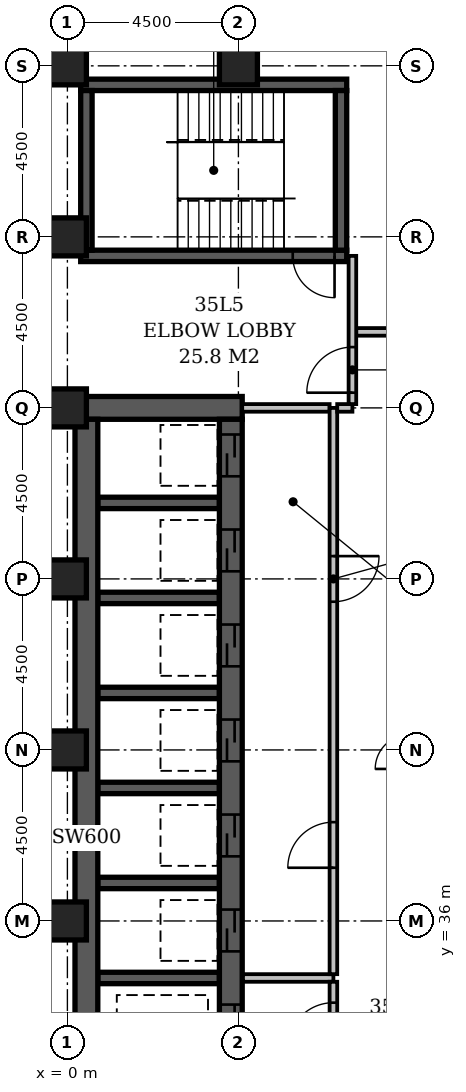
"""IFC4 building model, lengths in metres.
Left out: names, types, materials, properties, quantities, classifications, styles, units other than length and angle.
Written with IfcOpenShell. Run it as: python <this file> out.ifc"""

import sys

from ifc_helpers import new_model, si_unit, direction, frame, frame_2d, origin, origin_2d, place, context, subcontext, project, spatial, rectangle, extrude, element, fill, save


model = new_model("IFC4")
c1 = context("Model", 3, precision=1e-05, world=origin(), true_north=direction((0.0, 1.0)))
c2 = subcontext(c1, "Body", "Model", "MODEL_VIEW")
j1 = project(units=[si_unit("LENGTHUNIT", "METRE"), si_unit("PLANEANGLEUNIT", "RADIAN")], contexts=[c1])
p1 = place(None, origin())
s1 = spatial("IfcSite", under=j1, at=p1, CompositionType="ELEMENT")
p2 = place(p1, origin())
s2 = spatial("IfcBuilding", under=s1, at=p2, CompositionType="ELEMENT")
p3 = place(p2, frame((0.0, 0.0, 141.2)))
s3 = spatial("IfcBuildingStorey", under=s2, at=p3, CompositionType="ELEMENT", Elevation=141.2)
p4 = place(p3, frame((0.2, 49.5, -0.3), z_axis=(0.0, 0.0, 1.0), x_axis=(1.0, 0.0, 0.0)))
e1 = element("IfcWall", 1, at=p4, inside=s3, PredefinedType="SHEAR", context=c2, shape_type="SweptSolid", body=[
    extrude(rectangle(XDim=4.4, YDim=0.6, at=frame_2d((2.2, 0.0))), origin(), (0.0, 0.0, 1.0), 3.6),
])
p5 = place(p3, frame((0.35, 53.5, -0.3), z_axis=(0.0, 0.0, 1.0), x_axis=(1.0, 0.0, 0.0)))
e2 = element("IfcWall", 2, at=p5, inside=s3, PredefinedType="SHEAR", context=c2, shape_type="SweptSolid", body=[
    extrude(rectangle(XDim=7.0, YDim=0.3, at=frame_2d((3.5, 0.0))), origin(), (0.0, 0.0, 1.0), 3.6),
])
p6 = place(p5, frame((5.58, 0.0, 0.3)))
e3 = element("IfcOpeningElement", 3, at=p6, cuts=e2, PredefinedType="OPENING", context=c2, shape_type="SweptSolid", body=[
    extrude(rectangle(XDim=1.1, YDim=2.1, at=frame_2d((0.55, 1.05))), frame((0.0, 0.162, 0.0), z_axis=(0.0, -1.0, 0.0), x_axis=(1.0, 0.0, 0.0)), (0.0, 0.0, 1.0), 0.324),
])
p7 = place(p3, frame((0.35, 58.0, -0.3), z_axis=(0.0, 0.0, 1.0), x_axis=(1.0, 0.0, 0.0)))
e4 = element("IfcWall", 4, at=p7, inside=s3, PredefinedType="SHEAR", context=c2, shape_type="SweptSolid", body=[
    extrude(rectangle(XDim=7.0, YDim=0.3, at=frame_2d((3.5, 0.0))), origin(), (0.0, 0.0, 1.0), 3.6),
])
p8 = place(p3, frame((0.5, 27.15, -0.3), z_axis=(0.0, 0.0, 1.0), x_axis=(0.0, 1.0, 0.0)))
e5 = element("IfcWall", 5, at=p8, inside=s3, PredefinedType="SHEAR", context=c2, shape_type="SweptSolid", body=[
    extrude(rectangle(XDim=22.05, YDim=0.6, at=frame_2d((11.025, 0.0))), origin(), (0.0, 0.0, 1.0), 3.6),
])
p9 = place(p3, frame((0.5, 53.65, -0.3), z_axis=(0.0, 0.0, 1.0), x_axis=(0.0, 1.0, 0.0)))
e6 = element("IfcWall", 6, at=p9, inside=s3, PredefinedType="SHEAR", context=c2, shape_type="SweptSolid", body=[
    extrude(rectangle(XDim=4.2, YDim=0.3, at=frame_2d((2.1, 0.0))), origin(), (0.0, 0.0, 1.0), 3.6),
])
for number, where, z_axis, x_axis in (
    (7, (0.8, 34.5, -0.3), (0.0, 0.0, 1.0), (1.0, 0.0, 0.0)),
    (8, (0.8, 37.0, -0.3), (0.0, 0.0, 1.0), (1.0, 0.0, 0.0)),
    (9, (0.8, 39.5, -0.3), (0.0, 0.0, 1.0), (1.0, 0.0, 0.0)),
    (10, (0.8, 42.0, -0.3), (0.0, 0.0, 1.0), (1.0, 0.0, 0.0)),
    (11, (0.8, 44.5, -0.3), (0.0, 0.0, 1.0), (1.0, 0.0, 0.0)),
    (12, (0.8, 47.0, -0.3), (0.0, 0.0, 1.0), (1.0, 0.0, 0.0)),
):
    element("IfcWall", number, at=place(p3, frame(where, z_axis=z_axis, x_axis=x_axis)), inside=s3, PredefinedType="SHEAR", context=c2, shape_type="SweptSolid", body=[
        extrude(rectangle(XDim=3.2, YDim=0.3, at=frame_2d((1.6, 0.0))), origin(), (0.0, 0.0, 1.0), 3.6),
    ])
p10 = place(p3, frame((4.3, 27.15, -0.3), z_axis=(0.0, 0.0, 1.0), x_axis=(0.0, 1.0, 0.0)))
e13 = element("IfcWall", 13, at=p10, inside=s3, PredefinedType="SHEAR", context=c2, shape_type="SweptSolid", body=[
    extrude(rectangle(XDim=22.05, YDim=0.6, at=frame_2d((11.025, 0.0))), origin(), (0.0, 0.0, 1.0), 3.6),
])
p11 = place(p10, frame((3.05, 0.0, 0.3)))
e14 = element("IfcOpeningElement", 14, at=p11, cuts=e13, PredefinedType="OPENING", context=c2, shape_type="SweptSolid", body=[
    extrude(rectangle(XDim=1.1, YDim=2.1, at=frame_2d((0.55, 1.05))), frame((0.0, 0.312, 0.0), z_axis=(0.0, -1.0, 0.0), x_axis=(1.0, 0.0, 0.0)), (0.0, 0.0, 1.0), 0.624),
])
p12 = place(p10, frame((0.55, 0.0, 0.3)))
e15 = element("IfcOpeningElement", 15, at=p12, cuts=e13, PredefinedType="OPENING", context=c2, shape_type="SweptSolid", body=[
    extrude(rectangle(XDim=1.1, YDim=2.1, at=frame_2d((0.55, 1.05))), frame((0.0, 0.312, 0.0), z_axis=(0.0, -1.0, 0.0), x_axis=(1.0, 0.0, 0.0)), (0.0, 0.0, 1.0), 0.624),
])
p13 = place(p10, frame((20.55, 0.0, 0.3)))
e16 = element("IfcOpeningElement", 16, at=p13, cuts=e13, PredefinedType="OPENING", context=c2, shape_type="SweptSolid", body=[
    extrude(rectangle(XDim=1.1, YDim=2.1, at=frame_2d((0.55, 1.05))), frame((0.0, 0.312, 0.0), z_axis=(0.0, -1.0, 0.0), x_axis=(1.0, 0.0, 0.0)), (0.0, 0.0, 1.0), 0.624),
])
p14 = place(p10, frame((18.05, 0.0, 0.3)))
e17 = element("IfcOpeningElement", 17, at=p14, cuts=e13, PredefinedType="OPENING", context=c2, shape_type="SweptSolid", body=[
    extrude(rectangle(XDim=1.1, YDim=2.1, at=frame_2d((0.55, 1.05))), frame((0.0, 0.312, 0.0), z_axis=(0.0, -1.0, 0.0), x_axis=(1.0, 0.0, 0.0)), (0.0, 0.0, 1.0), 0.624),
])
p15 = place(p10, frame((15.55, 0.0, 0.3)))
e18 = element("IfcOpeningElement", 18, at=p15, cuts=e13, PredefinedType="OPENING", context=c2, shape_type="SweptSolid", body=[
    extrude(rectangle(XDim=1.1, YDim=2.1, at=frame_2d((0.55, 1.05))), frame((0.0, 0.312, 0.0), z_axis=(0.0, -1.0, 0.0), x_axis=(1.0, 0.0, 0.0)), (0.0, 0.0, 1.0), 0.624),
])
p16 = place(p10, frame((13.05, 0.0, 0.3)))
e19 = element("IfcOpeningElement", 19, at=p16, cuts=e13, PredefinedType="OPENING", context=c2, shape_type="SweptSolid", body=[
    extrude(rectangle(XDim=1.1, YDim=2.1, at=frame_2d((0.55, 1.05))), frame((0.0, 0.312, 0.0), z_axis=(0.0, -1.0, 0.0), x_axis=(1.0, 0.0, 0.0)), (0.0, 0.0, 1.0), 0.624),
])
p17 = place(p10, frame((10.55, 0.0, 0.3)))
e20 = element("IfcOpeningElement", 20, at=p17, cuts=e13, PredefinedType="OPENING", context=c2, shape_type="SweptSolid", body=[
    extrude(rectangle(XDim=1.1, YDim=2.1, at=frame_2d((0.55, 1.05))), frame((0.0, 0.312, 0.0), z_axis=(0.0, -1.0, 0.0), x_axis=(1.0, 0.0, 0.0)), (0.0, 0.0, 1.0), 0.624),
])
p18 = place(p10, frame((8.05, 0.0, 0.3)))
e21 = element("IfcOpeningElement", 21, at=p18, cuts=e13, PredefinedType="OPENING", context=c2, shape_type="SweptSolid", body=[
    extrude(rectangle(XDim=1.1, YDim=2.1, at=frame_2d((0.55, 1.05))), frame((0.0, 0.312, 0.0), z_axis=(0.0, -1.0, 0.0), x_axis=(1.0, 0.0, 0.0)), (0.0, 0.0, 1.0), 0.624),
])
p19 = place(p10, frame((5.55, 0.0, 0.3)))
e22 = element("IfcOpeningElement", 22, at=p19, cuts=e13, PredefinedType="OPENING", context=c2, shape_type="SweptSolid", body=[
    extrude(rectangle(XDim=1.1, YDim=2.1, at=frame_2d((0.55, 1.05))), frame((0.0, 0.312, 0.0), z_axis=(0.0, -1.0, 0.0), x_axis=(1.0, 0.0, 0.0)), (0.0, 0.0, 1.0), 0.624),
])
p20 = place(p3, frame((7.2, 53.65, -0.3), z_axis=(0.0, 0.0, 1.0), x_axis=(0.0, 1.0, 0.0)))
e23 = element("IfcWall", 23, at=p20, inside=s3, PredefinedType="SHEAR", context=c2, shape_type="SweptSolid", body=[
    extrude(rectangle(XDim=4.2, YDim=0.3, at=frame_2d((2.1, 0.0))), origin(), (0.0, 0.0, 1.0), 3.6),
])
for number, where, z_axis, x_axis in (
    (24, (0.0, 36.0, -0.3), (0.0, 0.0, 1.0), (1.0, 0.0, 0.0)),
    (25, (0.0, 40.5, -0.3), (0.0, 0.0, 1.0), (1.0, 0.0, 0.0)),
    (26, (0.0, 45.0, -0.3), (0.0, 0.0, 1.0), (1.0, 0.0, 0.0)),
    (27, (0.0, 49.5, -0.3), (0.0, 0.0, 1.0), (1.0, 0.0, 0.0)),
    (28, (0.0, 54.0, -0.3), (0.0, 0.0, 1.0), (1.0, 0.0, 0.0)),
    (29, (0.0, 58.5, -0.3), (0.0, 0.0, 1.0), (1.0, 0.0, 0.0)),
    (30, (4.5, 58.5, -0.3), (0.0, 0.0, 1.0), (1.0, 0.0, 0.0)),
):
    element("IfcColumn", number, at=place(p3, frame(where, z_axis=z_axis, x_axis=x_axis)), inside=s3, PredefinedType="COLUMN", context=c2, shape_type="SweptSolid", body=[
        extrude(rectangle(XDim=1.0, YDim=1.0, at=origin_2d()), origin(), (0.0, 0.0, 1.0), 3.6),
    ])
p21 = place(p3, frame((4.62, 34.5, 0.0), z_axis=(0.0, 0.0, 1.0), x_axis=(1.0, 0.0, 0.0)))
e31 = element("IfcWall", 31, at=p21, inside=s3, PredefinedType="PARTITIONING", context=c2, shape_type="SweptSolid", body=[
    extrude(rectangle(XDim=2.38, YDim=0.2, at=frame_2d((1.19, 0.0))), origin(), (0.0, 0.0, 1.0), 3.3),
])
p22 = place(p3, frame((7.0, 34.6, 0.0), z_axis=(0.0, 0.0, 1.0), x_axis=(0.0, 1.0, 0.0)))
e32 = element("IfcWall", 32, at=p22, inside=s3, PredefinedType="PARTITIONING", context=c2, shape_type="SweptSolid", body=[
    extrude(rectangle(XDim=14.9, YDim=0.2, at=frame_2d((7.45, 0.0))), origin(), (0.0, 0.0, 1.0), 3.3),
])
p23 = place(p22, frame((2.8, 0.0, 0.0)))
e33 = element("IfcOpeningElement", 33, at=p23, cuts=e32, PredefinedType="OPENING", context=c2, shape_type="SweptSolid", body=[
    extrude(rectangle(XDim=1.2, YDim=2.1, at=frame_2d((0.6, 1.05))), frame((0.0, 0.112, 0.0), z_axis=(0.0, -1.0, 0.0), x_axis=(1.0, 0.0, 0.0)), (0.0, 0.0, 1.0), 0.224),
])
p24 = place(p22, frame((9.8, 0.0, 0.0)))
e34 = element("IfcOpeningElement", 34, at=p24, cuts=e32, PredefinedType="OPENING", context=c2, shape_type="SweptSolid", body=[
    extrude(rectangle(XDim=1.2, YDim=2.1, at=frame_2d((0.6, 1.05))), frame((0.0, 0.112, 0.0), z_axis=(0.0, -1.0, 0.0), x_axis=(1.0, 0.0, 0.0)), (0.0, 0.0, 1.0), 0.224),
])
p25 = place(p3, frame((4.6, 49.5, 0.0), z_axis=(0.0, 0.0, 1.0), x_axis=(1.0, 0.0, 0.0)))
e35 = element("IfcWall", 35, at=p25, inside=s3, PredefinedType="PARTITIONING", context=c2, shape_type="SweptSolid", body=[
    extrude(rectangle(XDim=2.3, YDim=0.2, at=frame_2d((1.15, 0.0))), origin(), (0.0, 0.0, 1.0), 3.3),
])
p26 = place(p3, frame((7.0, 32.1, 0.0), z_axis=(0.0, 0.0, 1.0), x_axis=(0.0, 1.0, 0.0)))
e36 = element("IfcWall", 36, at=p26, inside=s3, PredefinedType="PARTITIONING", context=c2, shape_type="SweptSolid", body=[
    extrude(rectangle(XDim=2.3, YDim=0.2, at=frame_2d((1.15, 0.0))), origin(), (0.0, 0.0, 1.0), 3.3),
])
p27 = place(p26, frame((0.55, 0.0, 0.0)))
e37 = element("IfcOpeningElement", 37, at=p27, cuts=e36, PredefinedType="OPENING", context=c2, shape_type="SweptSolid", body=[
    extrude(rectangle(XDim=1.2, YDim=2.1, at=frame_2d((0.6, 1.05))), frame((0.0, 0.112, 0.0), z_axis=(0.0, -1.0, 0.0), x_axis=(1.0, 0.0, 0.0)), (0.0, 0.0, 1.0), 0.224),
])
p28 = place(p3, frame((7.1, 49.5, 0.0), z_axis=(0.0, 0.0, 1.0), x_axis=(1.0, 0.0, 0.0)))
e38 = element("IfcWall", 38, at=p28, inside=s3, PredefinedType="PARTITIONING", context=c2, shape_type="SweptSolid", body=[
    extrude(rectangle(XDim=0.4, YDim=0.2, at=frame_2d((0.2, 0.0))), origin(), (0.0, 0.0, 1.0), 3.3),
])
p29 = place(p3, frame((7.5, 49.6, 0.0), z_axis=(0.0, 0.0, 1.0), x_axis=(0.0, 1.0, 0.0)))
e39 = element("IfcWall", 39, at=p29, inside=s3, PredefinedType="PARTITIONING", context=c2, shape_type="SweptSolid", body=[
    extrude(rectangle(XDim=3.9, YDim=0.2, at=frame_2d((1.95, 0.0))), origin(), (0.0, 0.0, 1.0), 3.3),
])
p30 = place(p29, frame((0.3, 0.0, 0.0)))
e40 = element("IfcOpeningElement", 40, at=p30, cuts=e39, PredefinedType="OPENING", context=c2, shape_type="SweptSolid", body=[
    extrude(rectangle(XDim=1.2, YDim=2.1, at=frame_2d((0.6, 1.05))), frame((0.0, 0.112, 0.0), z_axis=(0.0, -1.0, 0.0), x_axis=(1.0, 0.0, 0.0)), (0.0, 0.0, 1.0), 0.224),
])
p31 = place(p3, frame((7.6, 51.5, 0.0), z_axis=(0.0, 0.0, 1.0), x_axis=(1.0, 0.0, 0.0)))
e41 = element("IfcWall", 41, at=p31, inside=s3, PredefinedType="PARTITIONING", context=c2, shape_type="SweptSolid", body=[
    extrude(rectangle(XDim=15.3, YDim=0.2, at=frame_2d((7.65, 0.0))), origin(), (0.0, 0.0, 1.0), 3.3),
])
p32 = place(p31, frame((7.2, 0.0, 0.0)))
e42 = element("IfcOpeningElement", 42, at=p32, cuts=e41, PredefinedType="OPENING", context=c2, shape_type="SweptSolid", body=[
    extrude(rectangle(XDim=0.9, YDim=2.1, at=frame_2d((0.45, 1.05))), frame((0.0, 0.112, 0.0), z_axis=(0.0, -1.0, 0.0), x_axis=(1.0, 0.0, 0.0)), (0.0, 0.0, 1.0), 0.224),
])
p33 = place(p30, origin())
e43 = element("IfcDoor", 43, at=p33, inside=s3, OperationType="SINGLE_SWING_LEFT", PredefinedType="DOOR", context=c2, shape_type="SweptSolid", body=[
    extrude(rectangle(XDim=1.2, YDim=2.1, at=frame_2d((0.6, 1.05))), frame((0.0, 0.025, 0.0), z_axis=(0.0, -1.0, 0.0), x_axis=(1.0, 0.0, 0.0)), (0.0, 0.0, 1.0), 0.05),
])
fill(e40, e43)
p34 = place(p13, origin())
e44 = element("IfcDoor", 44, at=p34, inside=s3, OperationType="SLIDING_TO_LEFT", PredefinedType="DOOR", context=c2, shape_type="SweptSolid", body=[
    extrude(rectangle(XDim=1.1, YDim=2.1, at=frame_2d((0.55, 1.05))), frame((0.0, 0.025, 0.0), z_axis=(0.0, -1.0, 0.0), x_axis=(1.0, 0.0, 0.0)), (0.0, 0.0, 1.0), 0.05),
])
fill(e16, e44)
p35 = place(p14, origin())
e45 = element("IfcDoor", 45, at=p35, inside=s3, OperationType="SLIDING_TO_LEFT", PredefinedType="DOOR", context=c2, shape_type="SweptSolid", body=[
    extrude(rectangle(XDim=1.1, YDim=2.1, at=frame_2d((0.55, 1.05))), frame((0.0, 0.025, 0.0), z_axis=(0.0, -1.0, 0.0), x_axis=(1.0, 0.0, 0.0)), (0.0, 0.0, 1.0), 0.05),
])
fill(e17, e45)
p36 = place(p15, origin())
e46 = element("IfcDoor", 46, at=p36, inside=s3, OperationType="SLIDING_TO_LEFT", PredefinedType="DOOR", context=c2, shape_type="SweptSolid", body=[
    extrude(rectangle(XDim=1.1, YDim=2.1, at=frame_2d((0.55, 1.05))), frame((0.0, 0.025, 0.0), z_axis=(0.0, -1.0, 0.0), x_axis=(1.0, 0.0, 0.0)), (0.0, 0.0, 1.0), 0.05),
])
fill(e18, e46)
p37 = place(p16, origin())
e47 = element("IfcDoor", 47, at=p37, inside=s3, OperationType="SLIDING_TO_LEFT", PredefinedType="DOOR", context=c2, shape_type="SweptSolid", body=[
    extrude(rectangle(XDim=1.1, YDim=2.1, at=frame_2d((0.55, 1.05))), frame((0.0, 0.025, 0.0), z_axis=(0.0, -1.0, 0.0), x_axis=(1.0, 0.0, 0.0)), (0.0, 0.0, 1.0), 0.05),
])
fill(e19, e47)
p38 = place(p17, origin())
e48 = element("IfcDoor", 48, at=p38, inside=s3, OperationType="SLIDING_TO_LEFT", PredefinedType="DOOR", context=c2, shape_type="SweptSolid", body=[
    extrude(rectangle(XDim=1.1, YDim=2.1, at=frame_2d((0.55, 1.05))), frame((0.0, 0.025, 0.0), z_axis=(0.0, -1.0, 0.0), x_axis=(1.0, 0.0, 0.0)), (0.0, 0.0, 1.0), 0.05),
])
fill(e20, e48)
p39 = place(p18, origin())
e49 = element("IfcDoor", 49, at=p39, inside=s3, OperationType="SLIDING_TO_LEFT", PredefinedType="DOOR", context=c2, shape_type="SweptSolid", body=[
    extrude(rectangle(XDim=1.1, YDim=2.1, at=frame_2d((0.55, 1.05))), frame((0.0, 0.025, 0.0), z_axis=(0.0, -1.0, 0.0), x_axis=(1.0, 0.0, 0.0)), (0.0, 0.0, 1.0), 0.05),
])
fill(e21, e49)
p40 = place(p23, origin())
e50 = element("IfcDoor", 50, at=p40, inside=s3, OperationType="SINGLE_SWING_LEFT", PredefinedType="DOOR", context=c2, shape_type="SweptSolid", body=[
    extrude(rectangle(XDim=1.2, YDim=2.1, at=frame_2d((0.6, 1.05))), frame((0.0, 0.025, 0.0), z_axis=(0.0, -1.0, 0.0), x_axis=(1.0, 0.0, 0.0)), (0.0, 0.0, 1.0), 0.05),
])
fill(e33, e50)
p41 = place(p24, origin())
e51 = element("IfcDoor", 51, at=p41, inside=s3, OperationType="SINGLE_SWING_RIGHT", PredefinedType="DOOR", context=c2, shape_type="SweptSolid", body=[
    extrude(rectangle(XDim=1.2, YDim=2.1, at=frame_2d((0.6, 1.05))), frame((0.0, 0.025, 0.0), z_axis=(0.0, -1.0, 0.0), x_axis=(1.0, 0.0, 0.0)), (0.0, 0.0, 1.0), 0.05),
])
fill(e34, e51)
p42 = place(p27, origin())
e52 = element("IfcDoor", 52, at=p42, inside=s3, OperationType="SINGLE_SWING_LEFT", PredefinedType="DOOR", context=c2, shape_type="SweptSolid", body=[
    extrude(rectangle(XDim=1.2, YDim=2.1, at=frame_2d((0.6, 1.05))), frame((0.0, 0.025, 0.0), z_axis=(0.0, -1.0, 0.0), x_axis=(1.0, 0.0, 0.0)), (0.0, 0.0, 1.0), 0.05),
])
fill(e37, e52)
p43 = place(p19, origin())
e53 = element("IfcDoor", 53, at=p43, inside=s3, OperationType="SLIDING_TO_LEFT", PredefinedType="DOOR", context=c2, shape_type="SweptSolid", body=[
    extrude(rectangle(XDim=1.1, YDim=2.1, at=frame_2d((0.55, 1.05))), frame((0.0, 0.025, 0.0), z_axis=(0.0, -1.0, 0.0), x_axis=(1.0, 0.0, 0.0)), (0.0, 0.0, 1.0), 0.05),
])
fill(e22, e53)
p44 = place(p6, origin())
e54 = element("IfcDoor", 54, at=p44, inside=s3, OperationType="SINGLE_SWING_RIGHT", PredefinedType="DOOR", context=c2, shape_type="SweptSolid", body=[
    extrude(rectangle(XDim=1.1, YDim=2.1, at=frame_2d((0.55, 1.05))), frame((0.0, 0.025, 0.0), z_axis=(0.0, -1.0, 0.0), x_axis=(1.0, 0.0, 0.0)), (0.0, 0.0, 1.0), 0.05),
])
fill(e3, e54)
save(model, sys.argv[1])
